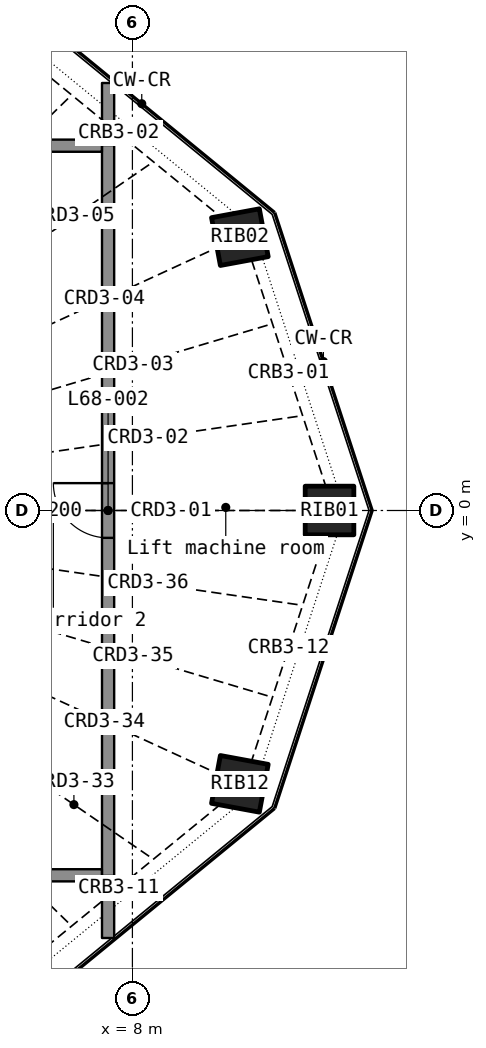
"""IFC4 building model, lengths in metres.
Left out: names, types, materials, properties, quantities, classifications, styles, units other than length and angle.
Written with IfcOpenShell. Run it as: python <this file> out.ifc"""

import sys

from ifc_helpers import new_model, si_unit, direction, frame, frame_2d, origin, origin_2d, place, context, subcontext, project, spatial, rectangle, hollow_rectangle, extrude, element, fill, save


model = new_model("IFC4")
c1 = context("Model", 3, precision=1e-05, world=origin(), true_north=direction((0.0, 1.0)))
c2 = subcontext(c1, "Body", "Model", "MODEL_VIEW")
j1 = project(units=[si_unit("LENGTHUNIT", "METRE"), si_unit("PLANEANGLEUNIT", "RADIAN")], contexts=[c1])
p1 = place(None, origin())
s1 = spatial("IfcSite", under=j1, at=p1, CompositionType="ELEMENT")
p2 = place(p1, origin())
s2 = spatial("IfcBuilding", under=s1, at=p2, CompositionType="ELEMENT")
p3 = place(p2, frame((0.0, 0.0, 280.4)))
s3 = spatial("IfcBuildingStorey", under=s2, at=p3, CompositionType="ELEMENT", Elevation=280.4)
p4 = place(p3, frame((11.242, 0.0, 0.0), z_axis=(-0.136914367, 0.0, 0.990582887), x_axis=(0.0, -1.0, 0.0)))
e1 = element("IfcColumn", 1, at=p4, inside=s3, PredefinedType="COLUMN", context=c2, shape_type="SweptSolid", body=[
    extrude(hollow_rectangle(XDim=0.8, YDim=0.8, WallThickness=0.025, at=origin_2d()), origin(), (0.0, 0.0, 1.0), 3.937),
])
for number, where, z_axis, x_axis in (
    (2, (9.767, 4.496, 0.0), (-0.119, -0.055, 0.991), (0.575, -0.818, 0.024)),
    (3, (9.767, -4.496, 0.0), (-0.119, 0.055, 0.991), (-0.575, -0.818, -0.024)),
):
    element("IfcColumn", number, at=place(p3, frame(where, z_axis=z_axis, x_axis=x_axis)), inside=s3, PredefinedType="COLUMN", context=c2, shape_type="SweptSolid", body=[
        extrude(hollow_rectangle(XDim=0.8, YDim=0.8, WallThickness=0.025, at=origin_2d()), origin(), (0.0, 0.0, 1.0), 3.934),
    ])
p5 = place(p3, frame((7.6, -6.012, 0.0), z_axis=(0.0, 0.0, 1.0), x_axis=(0.0, 1.0, 0.0)))
e4 = element("IfcWall", 4, at=p5, inside=s3, PredefinedType="PARTITIONING", context=c2, shape_type="SweptSolid", body=[
    extrude(rectangle(XDim=12.024, YDim=0.2, at=frame_2d((6.012, 0.0))), origin(), (0.0, 0.0, 1.0), 2.9),
])
p6 = place(p5, frame((5.562, 0.0, 0.0)))
e5 = element("IfcOpeningElement", 5, at=p6, cuts=e4, PredefinedType="OPENING", context=c2, shape_type="SweptSolid", body=[
    extrude(rectangle(XDim=0.9, YDim=2.1, at=frame_2d((0.45, 1.05))), frame((0.0, 0.11, 0.0), z_axis=(0.0, -1.0, 0.0), x_axis=(1.0, 0.0, 0.0)), (0.0, 0.0, 1.0), 0.22),
])
for number, where, z_axis, x_axis in (
    (6, (5.813, -6.0, 0.0), (0.0, 0.0, 1.0), (1.0, 0.0, 0.0)),
    (7, (7.498, 6.0, 0.0), (0.0, 0.0, 1.0), (-1.0, 0.0, 0.0)),
):
    element("IfcWall", number, at=place(p3, frame(where, z_axis=z_axis, x_axis=x_axis)), inside=s3, PredefinedType="PARTITIONING", context=c2, shape_type="SweptSolid", body=[
        extrude(rectangle(XDim=1.685, YDim=0.2, at=frame_2d((0.843, 0.0))), origin(), (0.0, 0.0, 1.0), 2.9),
    ])
p7 = place(p3, frame((7.6, -6.013, 0.0), z_axis=(0.0, 0.0, 1.0), x_axis=(0.0, -1.0, 0.0)))
e8 = element("IfcWall", 8, at=p7, inside=s3, PredefinedType="PARTITIONING", context=c2, shape_type="SweptSolid", body=[
    extrude(rectangle(XDim=1.019, YDim=0.2, at=frame_2d((0.509, 0.0))), origin(), (0.0, 0.0, 1.0), 2.9),
])
p8 = place(p3, frame((7.6, 7.031, 0.0), z_axis=(0.0, 0.0, 1.0), x_axis=(0.0, -1.0, 0.0)))
e9 = element("IfcWall", 9, at=p8, inside=s3, PredefinedType="PARTITIONING", context=c2, shape_type="SweptSolid", body=[
    extrude(rectangle(XDim=1.018, YDim=0.2, at=frame_2d((0.509, 0.0))), origin(), (0.0, 0.0, 1.0), 2.9),
])
p9 = place(p6, origin())
e10 = element("IfcDoor", 10, at=p9, inside=s3, OperationType="SINGLE_SWING_RIGHT", PredefinedType="DOOR", context=c2, shape_type="SweptSolid", body=[
    extrude(rectangle(XDim=0.9, YDim=2.1, at=frame_2d((0.45, 1.05))), frame((0.0, 0.025, 0.0), z_axis=(0.0, -1.0, 0.0), x_axis=(1.0, 0.0, 0.0)), (0.0, 0.0, 1.0), 0.05),
])
fill(e5, e10)
save(model, sys.argv[1])
